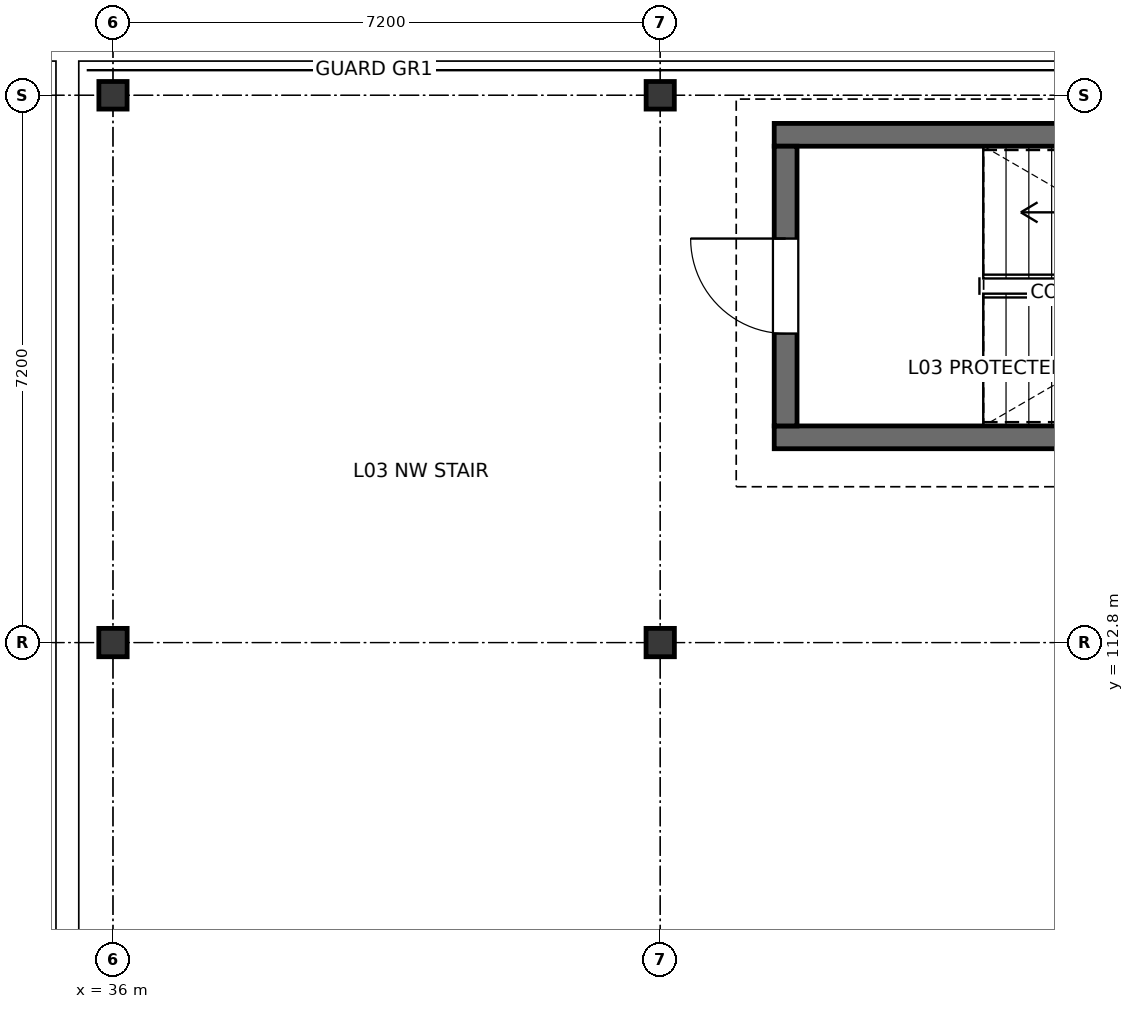
"""IFC4 building model, lengths in metres.
Left out: names, types, materials, properties, quantities, classifications, styles, units other than length and angle.
Written with IfcOpenShell. Run it as: python <this file> out.ifc"""

import sys

from ifc_helpers import new_model, si_unit, direction, frame, frame_2d, origin, origin_2d, place, context, subcontext, project, spatial, rectangle, i_section, extrude, element, fill, save


model = new_model("IFC4")
c1 = context("Model", 3, precision=1e-05, world=origin(), true_north=direction((0.0, 1.0)))
c2 = subcontext(c1, "Body", "Model", "MODEL_VIEW")
j1 = project(units=[si_unit("LENGTHUNIT", "METRE"), si_unit("PLANEANGLEUNIT", "RADIAN")], contexts=[c1])
p1 = place(None, origin())
s1 = spatial("IfcSite", under=j1, at=p1, CompositionType="ELEMENT")
p2 = place(p1, origin())
s2 = spatial("IfcBuilding", under=s1, at=p2, CompositionType="ELEMENT")
p3 = place(p2, frame((0.0, 0.0, 13.2)))
s3 = spatial("IfcBuildingStorey", under=s2, at=p3, CompositionType="ELEMENT", Elevation=13.2)
p4 = place(p3, frame((36.0, 112.8, 0.0), z_axis=(0.0, 0.0, 1.0), x_axis=(1.0, 0.0, 0.0)))
e1 = element("IfcColumn", 1, at=p4, inside=s3, PredefinedType="COLUMN", context=c2, shape_type="SweptSolid", body=[
    extrude(i_section(OverallWidth=0.373, OverallDepth=0.373, WebThickness=0.016, FlangeThickness=0.026, FilletRadius=0.015, at=origin_2d()), origin(), (0.0, 0.0, 1.0), 3.9),
])
p5 = place(p3, frame((36.0, 120.0, 0.0), z_axis=(0.0, 0.0, 1.0), x_axis=(1.0, 0.0, 0.0)))
e2 = element("IfcColumn", 2, at=p5, inside=s3, PredefinedType="COLUMN", context=c2, shape_type="SweptSolid", body=[
    extrude(i_section(OverallWidth=0.371, OverallDepth=0.363, WebThickness=0.013, FlangeThickness=0.022, FilletRadius=0.015, at=origin_2d()), origin(), (0.0, 0.0, 1.0), 3.9),
])
p6 = place(p3, frame((43.2, 112.8, 0.0), z_axis=(0.0, 0.0, 1.0), x_axis=(1.0, 0.0, 0.0)))
e3 = element("IfcColumn", 3, at=p6, inside=s3, PredefinedType="COLUMN", context=c2, shape_type="SweptSolid", body=[
    extrude(i_section(OverallWidth=0.373, OverallDepth=0.373, WebThickness=0.016, FlangeThickness=0.026, FilletRadius=0.015, at=origin_2d()), origin(), (0.0, 0.0, 1.0), 3.9),
])
p7 = place(p3, frame((43.2, 120.0, 0.0), z_axis=(0.0, 0.0, 1.0), x_axis=(1.0, 0.0, 0.0)))
e4 = element("IfcColumn", 4, at=p7, inside=s3, PredefinedType="COLUMN", context=c2, shape_type="SweptSolid", body=[
    extrude(i_section(OverallWidth=0.371, OverallDepth=0.363, WebThickness=0.013, FlangeThickness=0.022, FilletRadius=0.015, at=origin_2d()), origin(), (0.0, 0.0, 1.0), 3.9),
])
for number, where, z_axis, x_axis in (
    (5, (54.1, 115.5, 0.0), (0.0, 0.0, 1.0), (-1.0, 0.0, 0.0)),
    (6, (44.7, 119.48, 0.0), (0.0, 0.0, 1.0), (1.0, 0.0, 0.0)),
):
    element("IfcWall", number, at=place(p3, frame(where, z_axis=z_axis, x_axis=x_axis)), inside=s3, PredefinedType="SOLIDWALL", context=c2, shape_type="SweptSolid", body=[
        extrude(rectangle(XDim=9.4, YDim=0.3, at=frame_2d((4.7, 0.0))), origin(), (0.0, 0.0, 1.0), 3.66),
    ])
p8 = place(p3, frame((44.85, 115.65, 0.0), z_axis=(0.0, 0.0, 1.0), x_axis=(0.0, 1.0, 0.0)))
e7 = element("IfcWall", 7, at=p8, inside=s3, PredefinedType="SOLIDWALL", context=c2, shape_type="SweptSolid", body=[
    extrude(rectangle(XDim=3.68, YDim=0.3, at=frame_2d((1.84, 0.0))), origin(), (0.0, 0.0, 1.0), 3.66),
])
p9 = place(p8, frame((1.215, 0.0, 0.0)))
e8 = element("IfcOpeningElement", 8, at=p9, cuts=e7, PredefinedType="OPENING", context=c2, shape_type="SweptSolid", body=[
    extrude(rectangle(XDim=1.25, YDim=2.2, at=frame_2d((0.625, 1.1))), frame((0.0, 0.16, 0.0), z_axis=(0.0, -1.0, 0.0), x_axis=(1.0, 0.0, 0.0)), (0.0, 0.0, 1.0), 0.32),
])
p10 = place(p9, origin())
e9 = element("IfcDoor", 9, at=p10, inside=s3, OperationType="SINGLE_SWING_RIGHT", PredefinedType="DOOR", context=c2, shape_type="SweptSolid", body=[
    extrude(rectangle(XDim=1.25, YDim=2.2, at=frame_2d((0.625, 1.1))), frame((0.0, 0.025, 0.0), z_axis=(0.0, -1.0, 0.0), x_axis=(1.0, 0.0, 0.0)), (0.0, 0.0, 1.0), 0.05),
])
fill(e8, e9)
save(model, sys.argv[1])
